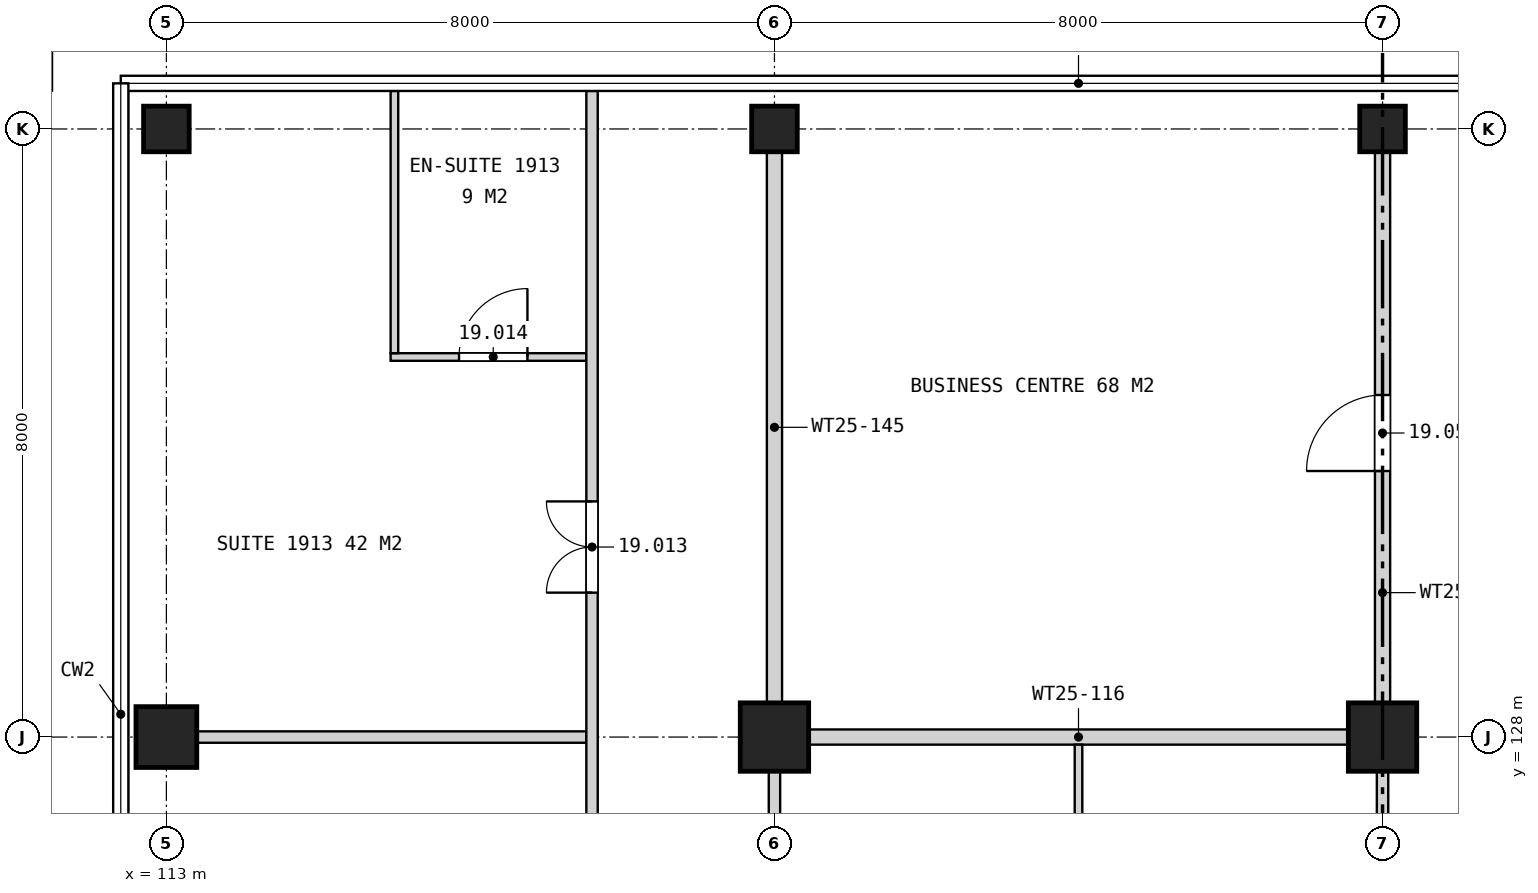
"""IFC4 building model, lengths in metres.
Left out: names, types, materials, properties, quantities, classifications, styles, units other than length and angle.
Written with IfcOpenShell. Run it as: python <this file> out.ifc"""

import sys

from ifc_helpers import new_model, si_unit, direction, frame, frame_2d, origin, origin_2d, place, context, subcontext, project, spatial, rectangle, extrude, element, fill, save


model = new_model("IFC4")
c1 = context("Model", 3, precision=1e-05, world=origin(), true_north=direction((0.0, 1.0)))
c2 = subcontext(c1, "Body", "Model", "MODEL_VIEW")
j1 = project(units=[si_unit("LENGTHUNIT", "METRE"), si_unit("PLANEANGLEUNIT", "RADIAN")], contexts=[c1])
p1 = place(None, origin())
s1 = spatial("IfcSite", under=j1, at=p1, CompositionType="ELEMENT")
p2 = place(p1, origin())
s2 = spatial("IfcBuilding", under=s1, at=p2, CompositionType="ELEMENT")
p3 = place(p2, frame((0.0, 0.0, 97.9)))
s3 = spatial("IfcBuildingStorey", under=s2, at=p3, CompositionType="ELEMENT", Elevation=97.9)
p4 = place(p3, frame((113.0, 128.0, 0.0), z_axis=(0.0, 0.0, 1.0), x_axis=(1.0, 0.0, 0.0)))
e1 = element("IfcColumn", 1, at=p4, inside=s3, PredefinedType="COLUMN", context=c2, shape_type="SweptSolid", body=[
    extrude(rectangle(XDim=0.8, YDim=0.8, at=origin_2d()), origin(), (0.0, 0.0, 1.0), 3.7),
])
p5 = place(p3, frame((113.0, 136.0, 0.0), z_axis=(0.0, 0.0, 1.0), x_axis=(1.0, 0.0, 0.0)))
e2 = element("IfcColumn", 2, at=p5, inside=s3, PredefinedType="COLUMN", context=c2, shape_type="SweptSolid", body=[
    extrude(rectangle(XDim=0.6, YDim=0.6, at=origin_2d()), origin(), (0.0, 0.0, 1.0), 3.7),
])
p6 = place(p3, frame((121.0, 128.0, 0.0), z_axis=(0.0, 0.0, 1.0), x_axis=(1.0, 0.0, 0.0)))
e3 = element("IfcColumn", 3, at=p6, inside=s3, PredefinedType="COLUMN", context=c2, shape_type="SweptSolid", body=[
    extrude(rectangle(XDim=0.9, YDim=0.9, at=origin_2d()), origin(), (0.0, 0.0, 1.0), 3.7),
])
p7 = place(p3, frame((121.0, 136.0, 0.0), z_axis=(0.0, 0.0, 1.0), x_axis=(1.0, 0.0, 0.0)))
e4 = element("IfcColumn", 4, at=p7, inside=s3, PredefinedType="COLUMN", context=c2, shape_type="SweptSolid", body=[
    extrude(rectangle(XDim=0.6, YDim=0.6, at=origin_2d()), origin(), (0.0, 0.0, 1.0), 3.7),
])
p8 = place(p3, frame((129.0, 128.0, 0.0), z_axis=(0.0, 0.0, 1.0), x_axis=(1.0, 0.0, 0.0)))
e5 = element("IfcColumn", 5, at=p8, inside=s3, PredefinedType="COLUMN", context=c2, shape_type="SweptSolid", body=[
    extrude(rectangle(XDim=0.9, YDim=0.9, at=origin_2d()), origin(), (0.0, 0.0, 1.0), 3.7),
])
p9 = place(p3, frame((129.0, 136.0, 0.0), z_axis=(0.0, 0.0, 1.0), x_axis=(1.0, 0.0, 0.0)))
e6 = element("IfcColumn", 6, at=p9, inside=s3, PredefinedType="COLUMN", context=c2, shape_type="SweptSolid", body=[
    extrude(rectangle(XDim=0.6, YDim=0.6, at=origin_2d()), origin(), (0.0, 0.0, 1.0), 3.7),
])
p10 = place(p3, frame((113.4, 128.0, 0.0), z_axis=(0.0, 0.0, 1.0), x_axis=(1.0, 0.0, 0.0)))
e7 = element("IfcWall", 7, at=p10, inside=s3, PredefinedType="PARTITIONING", context=c2, shape_type="SweptSolid", body=[
    extrude(rectangle(XDim=5.125, YDim=0.15, at=frame_2d((2.562, 0.0))), origin(), (0.0, 0.0, 1.0), 2.96),
])
p11 = place(p3, frame((121.45, 128.0, 0.0), z_axis=(0.0, 0.0, 1.0), x_axis=(1.0, 0.0, 0.0)))
e8 = element("IfcWall", 8, at=p11, inside=s3, PredefinedType="PARTITIONING", context=c2, shape_type="SweptSolid", body=[
    extrude(rectangle(XDim=7.1, YDim=0.2, at=frame_2d((3.55, 0.0))), origin(), (0.0, 0.0, 1.0), 2.96),
])
p12 = place(p3, frame((115.95, 133.0, 0.0), z_axis=(0.0, 0.0, 1.0), x_axis=(1.0, 0.0, 0.0)))
e9 = element("IfcWall", 9, at=p12, inside=s3, PredefinedType="PLUMBINGWALL", context=c2, shape_type="SweptSolid", body=[
    extrude(rectangle(XDim=2.575, YDim=0.1, at=frame_2d((1.288, 0.0))), origin(), (0.0, 0.0, 1.0), 3.7),
])
p13 = place(p12, frame((0.9, 0.0, 0.0)))
e10 = element("IfcOpeningElement", 10, at=p13, cuts=e9, PredefinedType="OPENING", context=c2, shape_type="SweptSolid", body=[
    extrude(rectangle(XDim=0.9, YDim=2.1, at=frame_2d((0.45, 1.05))), frame((0.0, 0.06, 0.0), z_axis=(0.0, -1.0, 0.0), x_axis=(1.0, 0.0, 0.0)), (0.0, 0.0, 1.0), 0.12),
])
p14 = place(p3, frame((116.0, 133.05, 0.0), z_axis=(0.0, 0.0, 1.0), x_axis=(0.0, 1.0, 0.0)))
e11 = element("IfcWall", 11, at=p14, inside=s3, PredefinedType="PLUMBINGWALL", context=c2, shape_type="SweptSolid", body=[
    extrude(rectangle(XDim=3.45, YDim=0.1, at=frame_2d((1.725, 0.0))), origin(), (0.0, 0.0, 1.0), 2.963),
])
p15 = place(p3, frame((118.6, 112.0, 0.0), z_axis=(0.0, 0.0, 1.0), x_axis=(0.0, 1.0, 0.0)))
e12 = element("IfcWall", 12, at=p15, inside=s3, PredefinedType="PARTITIONING", context=c2, shape_type="SweptSolid", body=[
    extrude(rectangle(XDim=24.5, YDim=0.15, at=frame_2d((12.25, 0.0))), origin(), (0.0, 0.0, 1.0), 2.957),
])
p16 = place(p15, frame((1.9, 0.0, 0.0)))
e13 = element("IfcOpeningElement", 13, at=p16, cuts=e12, PredefinedType="OPENING", context=c2, shape_type="SweptSolid", body=[
    extrude(rectangle(XDim=1.2, YDim=2.2, at=frame_2d((0.6, 1.1))), frame((0.0, 0.085, 0.0), z_axis=(0.0, -1.0, 0.0), x_axis=(1.0, 0.0, 0.0)), (0.0, 0.0, 1.0), 0.17),
])
p17 = place(p15, frame((12.9, 0.0, 0.0)))
e14 = element("IfcOpeningElement", 14, at=p17, cuts=e12, PredefinedType="OPENING", context=c2, shape_type="SweptSolid", body=[
    extrude(rectangle(XDim=1.2, YDim=2.2, at=frame_2d((0.6, 1.1))), frame((0.0, 0.085, 0.0), z_axis=(0.0, -1.0, 0.0), x_axis=(1.0, 0.0, 0.0)), (0.0, 0.0, 1.0), 0.17),
])
p18 = place(p15, frame((17.9, 0.0, 0.0)))
e15 = element("IfcOpeningElement", 15, at=p18, cuts=e12, PredefinedType="OPENING", context=c2, shape_type="SweptSolid", body=[
    extrude(rectangle(XDim=1.2, YDim=2.2, at=frame_2d((0.6, 1.1))), frame((0.0, 0.085, 0.0), z_axis=(0.0, -1.0, 0.0), x_axis=(1.0, 0.0, 0.0)), (0.0, 0.0, 1.0), 0.17),
])
p19 = place(p3, frame((121.0, 120.5, 0.0), z_axis=(0.0, 0.0, 1.0), x_axis=(0.0, 1.0, 0.0)))
e16 = element("IfcWall", 16, at=p19, inside=s3, PredefinedType="PARTITIONING", context=c2, shape_type="SweptSolid", body=[
    extrude(rectangle(XDim=7.05, YDim=0.15, at=frame_2d((3.525, 0.0))), origin(), (0.0, 0.0, 1.0), 2.96),
])
p20 = place(p19, frame((3.0, 0.0, 0.0)))
e17 = element("IfcOpeningElement", 17, at=p20, cuts=e16, PredefinedType="OPENING", context=c2, shape_type="SweptSolid", body=[
    extrude(rectangle(XDim=1.0, YDim=2.1, at=frame_2d((0.5, 1.05))), frame((0.0, 0.085, 0.0), z_axis=(0.0, -1.0, 0.0), x_axis=(1.0, 0.0, 0.0)), (0.0, 0.0, 1.0), 0.17),
])
p21 = place(p3, frame((121.0, 128.45, 0.0), z_axis=(0.0, 0.0, 1.0), x_axis=(0.0, 1.0, 0.0)))
e18 = element("IfcWall", 18, at=p21, inside=s3, PredefinedType="PARTITIONING", context=c2, shape_type="SweptSolid", body=[
    extrude(rectangle(XDim=7.25, YDim=0.2, at=frame_2d((3.625, 0.0))), origin(), (0.0, 0.0, 1.0), 2.96),
])
p22 = place(p3, frame((125.0, 120.1, 0.0), z_axis=(0.0, 0.0, 1.0), x_axis=(0.0, 1.0, 0.0)))
e19 = element("IfcWall", 19, at=p22, inside=s3, PredefinedType="PARTITIONING", context=c2, shape_type="SweptSolid", body=[
    extrude(rectangle(XDim=7.8, YDim=0.1, at=frame_2d((3.9, 0.0))), origin(), (0.0, 0.0, 1.0), 3.014),
])
p23 = place(p3, frame((129.0, 120.5, 0.0), z_axis=(0.0, 0.0, 1.0), x_axis=(0.0, 1.0, 0.0)))
e20 = element("IfcWall", 20, at=p23, inside=s3, PredefinedType="PARTITIONING", context=c2, shape_type="SweptSolid", body=[
    extrude(rectangle(XDim=7.05, YDim=0.15, at=frame_2d((3.525, 0.0))), origin(), (0.0, 0.0, 1.0), 2.96),
])
p24 = place(p23, frame((3.0, 0.0, 0.0)))
e21 = element("IfcOpeningElement", 21, at=p24, cuts=e20, PredefinedType="OPENING", context=c2, shape_type="SweptSolid", body=[
    extrude(rectangle(XDim=1.0, YDim=2.1, at=frame_2d((0.5, 1.05))), frame((0.0, 0.085, 0.0), z_axis=(0.0, -1.0, 0.0), x_axis=(1.0, 0.0, 0.0)), (0.0, 0.0, 1.0), 0.17),
])
p25 = place(p3, frame((129.0, 128.45, 0.0), z_axis=(0.0, 0.0, 1.0), x_axis=(0.0, 1.0, 0.0)))
e22 = element("IfcWall", 22, at=p25, inside=s3, PredefinedType="PARTITIONING", context=c2, shape_type="SweptSolid", body=[
    extrude(rectangle(XDim=7.25, YDim=0.2, at=frame_2d((3.625, 0.0))), origin(), (0.0, 0.0, 1.0), 2.96),
])
p26 = place(p25, frame((3.05, 0.0, 0.0)))
e23 = element("IfcOpeningElement", 23, at=p26, cuts=e22, PredefinedType="OPENING", context=c2, shape_type="SweptSolid", body=[
    extrude(rectangle(XDim=1.0, YDim=2.1, at=frame_2d((0.5, 1.05))), frame((0.0, 0.11, 0.0), z_axis=(0.0, -1.0, 0.0), x_axis=(1.0, 0.0, 0.0)), (0.0, 0.0, 1.0), 0.22),
])
p27 = place(p18, origin())
e24 = element("IfcDoor", 24, at=p27, inside=s3, OperationType="DOUBLE_DOOR_SINGLE_SWING", PredefinedType="DOOR", context=c2, shape_type="SweptSolid", body=[
    extrude(rectangle(XDim=1.2, YDim=2.2, at=frame_2d((0.6, 1.1))), frame((0.0, 0.025, 0.0), z_axis=(0.0, -1.0, 0.0), x_axis=(1.0, 0.0, 0.0)), (0.0, 0.0, 1.0), 0.05),
])
fill(e15, e24)
p28 = place(p13, origin())
e25 = element("IfcDoor", 25, at=p28, inside=s3, OperationType="SINGLE_SWING_RIGHT", PredefinedType="DOOR", context=c2, shape_type="SweptSolid", body=[
    extrude(rectangle(XDim=0.9, YDim=2.1, at=frame_2d((0.45, 1.05))), frame((0.0, 0.025, 0.0), z_axis=(0.0, -1.0, 0.0), x_axis=(1.0, 0.0, 0.0)), (0.0, 0.0, 1.0), 0.05),
])
fill(e10, e25)
p29 = place(p26, origin())
e26 = element("IfcDoor", 26, at=p29, inside=s3, OperationType="SINGLE_SWING_LEFT", PredefinedType="DOOR", context=c2, shape_type="SweptSolid", body=[
    extrude(rectangle(XDim=1.0, YDim=2.1, at=frame_2d((0.5, 1.05))), frame((0.0, 0.025, 0.0), z_axis=(0.0, -1.0, 0.0), x_axis=(1.0, 0.0, 0.0)), (0.0, 0.0, 1.0), 0.05),
])
fill(e23, e26)
save(model, sys.argv[1])
